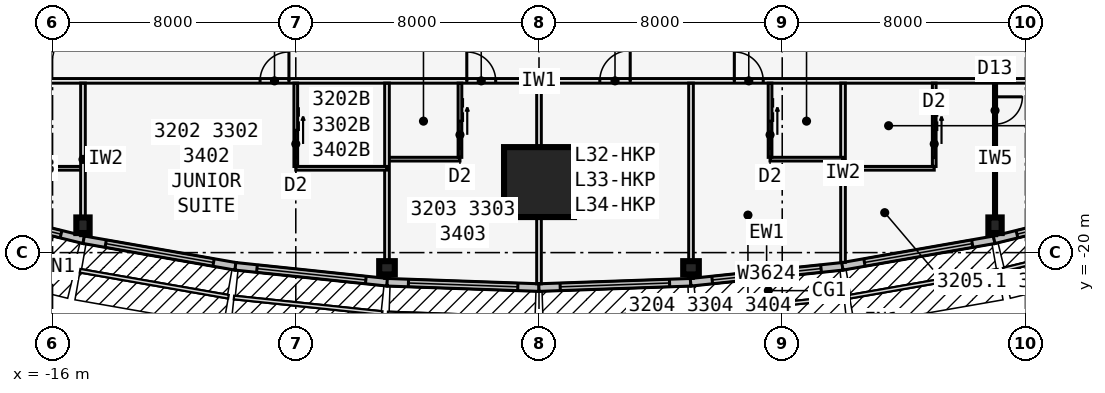
"""IFC4 building model, lengths in metres.
Left out: names, types, materials, properties, quantities, classifications, styles, units other than length and angle.
Written with IfcOpenShell. Run it as: python <this file> out.ifc"""

import sys

from ifc_helpers import new_model, si_unit, direction, frame, frame_2d, origin, origin_2d, place, context, subcontext, project, spatial, rectangle, i_section, extrude, element, fill, save


model = new_model("IFC4")
c1 = context("Model", 3, precision=1e-05, world=origin(), true_north=direction((0.0, 1.0)))
c2 = subcontext(c1, "Body", "Model", "MODEL_VIEW")
j1 = project(units=[si_unit("LENGTHUNIT", "METRE"), si_unit("PLANEANGLEUNIT", "RADIAN")], contexts=[c1])
p1 = place(None, origin())
s1 = spatial("IfcSite", under=j1, at=p1, CompositionType="ELEMENT")
p2 = place(p1, origin())
s2 = spatial("IfcBuilding", under=s1, at=p2, CompositionType="ELEMENT")
p3 = place(p2, frame((0.0, 0.0, 124.9)))
s3 = spatial("IfcBuildingStorey", under=s2, at=p3, CompositionType="ELEMENT", Elevation=124.9)
for number, where, z_axis, x_axis in (
    (1, (-15.0, -19.1, 0.0), (0.0, 0.0, 1.0), (1.0, 0.0, 0.0)),
    (2, (-5.0, -20.5, 0.0), (0.0, 0.0, 1.0), (0.0, -1.0, 0.0)),
    (3, (5.0, -20.5, 0.0), (0.0, 0.0, 1.0), (0.0, -1.0, 0.0)),
    (4, (15.0, -19.1, 0.0), (0.0, 0.0, 1.0), (1.0, 0.0, 0.0)),
):
    element("IfcColumn", number, at=place(p3, frame(where, z_axis=z_axis, x_axis=x_axis)), inside=s3, PredefinedType="COLUMN", context=c2, shape_type="SweptSolid", body=[
        extrude(i_section(OverallWidth=0.437, OverallDepth=0.513, WebThickness=0.061, FlangeThickness=0.097, at=origin_2d()), origin(), (0.0, 0.0, 1.0), 3.4),
    ])
p4 = place(p3, frame((0.0, -17.68, 0.0), z_axis=(0.0, 0.0, 1.0), x_axis=(0.0, -1.0, 0.0)))
e5 = element("IfcColumn", 5, at=p4, inside=s3, PredefinedType="COLUMN", context=c2, shape_type="SweptSolid", body=[
    extrude(rectangle(XDim=2.3, YDim=2.3, at=origin_2d()), origin(), (0.0, 0.0, 1.0), 3.4),
])
p5 = place(p3, frame((-19.97, -18.354, 0.0), z_axis=(0.0, 0.0, 1.0), x_axis=(0.971270024053, -0.237980126011, 0.0)))
e6 = element("IfcWall", 6, at=p5, inside=s3, PredefinedType="STANDARD", context=c2, shape_type="SweptSolid", body=[
    extrude(rectangle(XDim=5.148, YDim=0.25, at=frame_2d((2.574, 0.0))), origin(), (0.0, 0.0, 1.0), 3.235),
])
p6 = place(p5, frame((0.774, 0.0, 0.45)))
e7 = element("IfcOpeningElement", 7, at=p6, cuts=e6, PredefinedType="OPENING", context=c2, shape_type="SweptSolid", body=[
    extrude(rectangle(XDim=3.6, YDim=2.4, at=frame_2d((1.8, 1.2))), frame((0.0, 0.135, 0.0), z_axis=(0.0, -1.0, 0.0), x_axis=(1.0, 0.0, 0.0)), (0.0, 0.0, 1.0), 0.27),
])
p7 = place(p3, frame((-14.979, -19.577, 0.0), z_axis=(0.0, 0.0, 1.0), x_axis=(0.985030467156, -0.172380331752, 0.0)))
e8 = element("IfcWall", 8, at=p7, inside=s3, PredefinedType="STANDARD", context=c2, shape_type="SweptSolid", body=[
    extrude(rectangle(XDim=5.076, YDim=0.25, at=frame_2d((2.538, 0.0))), origin(), (0.0, 0.0, 1.0), 3.235),
])
p8 = place(p7, frame((0.738, 0.0, 0.45)))
e9 = element("IfcOpeningElement", 9, at=p8, cuts=e8, PredefinedType="OPENING", context=c2, shape_type="SweptSolid", body=[
    extrude(rectangle(XDim=3.6, YDim=2.4, at=frame_2d((1.8, 1.2))), frame((0.0, 0.135, 0.0), z_axis=(0.0, -1.0, 0.0), x_axis=(1.0, 0.0, 0.0)), (0.0, 0.0, 1.0), 0.27),
])
p9 = place(p3, frame((-9.987, -20.451, 0.0), z_axis=(0.0, 0.0, 1.0), x_axis=(0.994534683851, -0.104406717299, 0.0)))
e10 = element("IfcWall", 10, at=p9, inside=s3, PredefinedType="STANDARD", context=c2, shape_type="SweptSolid", body=[
    extrude(rectangle(XDim=5.028, YDim=0.25, at=frame_2d((2.514, 0.0))), origin(), (0.0, 0.0, 1.0), 3.235),
])
p10 = place(p9, frame((0.714, 0.0, 0.45)))
e11 = element("IfcOpeningElement", 11, at=p10, cuts=e10, PredefinedType="OPENING", context=c2, shape_type="SweptSolid", body=[
    extrude(rectangle(XDim=3.6, YDim=2.4, at=frame_2d((1.8, 1.2))), frame((0.0, 0.135, 0.0), z_axis=(0.0, -1.0, 0.0), x_axis=(1.0, 0.0, 0.0)), (0.0, 0.0, 1.0), 0.27),
])
p11 = place(p3, frame((-4.996, -20.975, 0.0), z_axis=(0.0, 0.0, 1.0), x_axis=(0.999387720943, -0.034988329879, 0.0)))
e12 = element("IfcWall", 12, at=p11, inside=s3, PredefinedType="STANDARD", context=c2, shape_type="SweptSolid", body=[
    extrude(rectangle(XDim=5.003, YDim=0.25, at=frame_2d((2.501, 0.0))), origin(), (0.0, 0.0, 1.0), 3.235),
])
p12 = place(p11, frame((0.701, 0.0, 0.45)))
e13 = element("IfcOpeningElement", 13, at=p12, cuts=e12, PredefinedType="OPENING", context=c2, shape_type="SweptSolid", body=[
    extrude(rectangle(XDim=3.6, YDim=2.4, at=frame_2d((1.8, 1.2))), frame((0.0, 0.135, 0.0), z_axis=(0.0, -1.0, 0.0), x_axis=(1.0, 0.0, 0.0)), (0.0, 0.0, 1.0), 0.27),
])
p13 = place(p3, frame((-0.004, -21.15, 0.0), z_axis=(0.0, 0.0, 1.0), x_axis=(0.999387720943, 0.034988329879, 0.0)))
e14 = element("IfcWall", 14, at=p13, inside=s3, PredefinedType="STANDARD", context=c2, shape_type="SweptSolid", body=[
    extrude(rectangle(XDim=5.003, YDim=0.25, at=frame_2d((2.501, 0.0))), origin(), (0.0, 0.0, 1.0), 3.235),
])
p14 = place(p13, frame((0.701, 0.0, 0.45)))
e15 = element("IfcOpeningElement", 15, at=p14, cuts=e14, PredefinedType="OPENING", context=c2, shape_type="SweptSolid", body=[
    extrude(rectangle(XDim=3.6, YDim=2.4, at=frame_2d((1.8, 1.2))), frame((0.0, 0.135, 0.0), z_axis=(0.0, -1.0, 0.0), x_axis=(1.0, 0.0, 0.0)), (0.0, 0.0, 1.0), 0.27),
])
p15 = place(p3, frame((4.987, -20.976, 0.0), z_axis=(0.0, 0.0, 1.0), x_axis=(0.994534683851, 0.104406717299, 0.0)))
e16 = element("IfcWall", 16, at=p15, inside=s3, PredefinedType="STANDARD", context=c2, shape_type="SweptSolid", body=[
    extrude(rectangle(XDim=5.028, YDim=0.25, at=frame_2d((2.514, 0.0))), origin(), (0.0, 0.0, 1.0), 3.235),
])
p16 = place(p15, frame((0.714, 0.0, 0.45)))
e17 = element("IfcOpeningElement", 17, at=p16, cuts=e16, PredefinedType="OPENING", context=c2, shape_type="SweptSolid", body=[
    extrude(rectangle(XDim=3.6, YDim=2.4, at=frame_2d((1.8, 1.2))), frame((0.0, 0.135, 0.0), z_axis=(0.0, -1.0, 0.0), x_axis=(1.0, 0.0, 0.0)), (0.0, 0.0, 1.0), 0.27),
])
p17 = place(p3, frame((9.979, -20.452, 0.0), z_axis=(0.0, 0.0, 1.0), x_axis=(0.985030467156, 0.172380331752, 0.0)))
e18 = element("IfcWall", 18, at=p17, inside=s3, PredefinedType="STANDARD", context=c2, shape_type="SweptSolid", body=[
    extrude(rectangle(XDim=5.076, YDim=0.25, at=frame_2d((2.538, 0.0))), origin(), (0.0, 0.0, 1.0), 3.235),
])
p18 = place(p17, frame((0.738, 0.0, 0.45)))
e19 = element("IfcOpeningElement", 19, at=p18, cuts=e18, PredefinedType="OPENING", context=c2, shape_type="SweptSolid", body=[
    extrude(rectangle(XDim=3.6, YDim=2.4, at=frame_2d((1.8, 1.2))), frame((0.0, 0.135, 0.0), z_axis=(0.0, -1.0, 0.0), x_axis=(1.0, 0.0, 0.0)), (0.0, 0.0, 1.0), 0.27),
])
p19 = place(p3, frame((14.97, -19.579, 0.0), z_axis=(0.0, 0.0, 1.0), x_axis=(0.971270024053, 0.237980126011, 0.0)))
e20 = element("IfcWall", 20, at=p19, inside=s3, PredefinedType="STANDARD", context=c2, shape_type="SweptSolid", body=[
    extrude(rectangle(XDim=5.148, YDim=0.25, at=frame_2d((2.574, 0.0))), origin(), (0.0, 0.0, 1.0), 3.235),
])
p20 = place(p19, frame((0.774, 0.0, 0.45)))
e21 = element("IfcOpeningElement", 21, at=p20, cuts=e20, PredefinedType="OPENING", context=c2, shape_type="SweptSolid", body=[
    extrude(rectangle(XDim=3.6, YDim=2.4, at=frame_2d((1.8, 1.2))), frame((0.0, 0.135, 0.0), z_axis=(0.0, -1.0, 0.0), x_axis=(1.0, 0.0, 0.0)), (0.0, 0.0, 1.0), 0.27),
])
p21 = place(p3, frame((-23.857, -14.351, 0.0), z_axis=(0.0, 0.0, 1.0), x_axis=(1.0, 0.0, 0.0)))
e22 = element("IfcWall", 22, at=p21, inside=s3, PredefinedType="PARTITIONING", context=c2, shape_type="SweptSolid", body=[
    extrude(rectangle(XDim=47.714, YDim=0.15, at=frame_2d((23.857, 0.0))), origin(), (0.0, 0.0, 1.0), 3.235),
])
p22 = place(p21, frame((4.682, 0.0, 0.0)))
e23 = element("IfcOpeningElement", 23, at=p22, cuts=e22, PredefinedType="OPENING", context=c2, shape_type="SweptSolid", body=[
    extrude(rectangle(XDim=0.95, YDim=2.13, at=frame_2d((0.475, 1.065))), frame((0.0, 0.085, 0.0), z_axis=(0.0, -1.0, 0.0), x_axis=(1.0, 0.0, 0.0)), (0.0, 0.0, 1.0), 0.17),
])
p23 = place(p21, frame((14.682, 0.0, 0.0)))
e24 = element("IfcOpeningElement", 24, at=p23, cuts=e22, PredefinedType="OPENING", context=c2, shape_type="SweptSolid", body=[
    extrude(rectangle(XDim=0.95, YDim=2.13, at=frame_2d((0.475, 1.065))), frame((0.0, 0.085, 0.0), z_axis=(0.0, -1.0, 0.0), x_axis=(1.0, 0.0, 0.0)), (0.0, 0.0, 1.0), 0.17),
])
p24 = place(p21, frame((21.482, 0.0, 0.0)))
e25 = element("IfcOpeningElement", 25, at=p24, cuts=e22, PredefinedType="OPENING", context=c2, shape_type="SweptSolid", body=[
    extrude(rectangle(XDim=0.95, YDim=2.13, at=frame_2d((0.475, 1.065))), frame((0.0, 0.085, 0.0), z_axis=(0.0, -1.0, 0.0), x_axis=(1.0, 0.0, 0.0)), (0.0, 0.0, 1.0), 0.17),
])
p25 = place(p21, frame((25.857, 0.0, 0.0)))
e26 = element("IfcOpeningElement", 26, at=p25, cuts=e22, PredefinedType="OPENING", context=c2, shape_type="SweptSolid", body=[
    extrude(rectangle(XDim=1.0, YDim=2.13, at=frame_2d((0.5, 1.065))), frame((0.0, 0.085, 0.0), z_axis=(0.0, -1.0, 0.0), x_axis=(1.0, 0.0, 0.0)), (0.0, 0.0, 1.0), 0.17),
])
p26 = place(p21, frame((30.282, 0.0, 0.0)))
e27 = element("IfcOpeningElement", 27, at=p26, cuts=e22, PredefinedType="OPENING", context=c2, shape_type="SweptSolid", body=[
    extrude(rectangle(XDim=0.95, YDim=2.13, at=frame_2d((0.475, 1.065))), frame((0.0, 0.085, 0.0), z_axis=(0.0, -1.0, 0.0), x_axis=(1.0, 0.0, 0.0)), (0.0, 0.0, 1.0), 0.17),
])
p27 = place(p21, frame((43.041, 0.0, 0.0)))
e28 = element("IfcOpeningElement", 28, at=p27, cuts=e22, PredefinedType="OPENING", context=c2, shape_type="SweptSolid", body=[
    extrude(rectangle(XDim=0.95, YDim=2.13, at=frame_2d((0.475, 1.065))), frame((0.0, 0.085, 0.0), z_axis=(0.0, -1.0, 0.0), x_axis=(1.0, 0.0, 0.0)), (0.0, 0.0, 1.0), 0.17),
])
p28 = place(p3, frame((-15.0, -14.426, 0.0), z_axis=(0.0, 0.0, 1.0), x_axis=(0.0, -1.0, 0.0)))
e29 = element("IfcWall", 29, at=p28, inside=s3, PredefinedType="PARTITIONING", context=c2, shape_type="SweptSolid", body=[
    extrude(rectangle(XDim=5.017, YDim=0.15, at=frame_2d((2.508, 0.0))), origin(), (0.0, 0.0, 1.0), 2.389),
])
p29 = place(p3, frame((-5.0, -14.426, 0.0), z_axis=(0.0, 0.0, 1.0), x_axis=(0.0, -1.0, 0.0)))
e30 = element("IfcWall", 30, at=p29, inside=s3, PredefinedType="PARTITIONING", context=c2, shape_type="SweptSolid", body=[
    extrude(rectangle(XDim=6.423, YDim=0.15, at=frame_2d((3.211, 0.0))), origin(), (0.0, 0.0, 1.0), 2.389),
])
p30 = place(p3, frame((0.0, -14.426, 0.0), z_axis=(0.0, 0.0, 1.0), x_axis=(0.0, -1.0, 0.0)))
e31 = element("IfcWall", 31, at=p30, inside=s3, PredefinedType="PARTITIONING", context=c2, shape_type="SweptSolid", body=[
    extrude(rectangle(XDim=6.599, YDim=0.15, at=frame_2d((3.299, 0.0))), origin(), (0.0, 0.0, 1.0), 2.389),
])
p31 = place(p3, frame((5.0, -14.426, 0.0), z_axis=(0.0, 0.0, 1.0), x_axis=(0.0, -1.0, 0.0)))
e32 = element("IfcWall", 32, at=p31, inside=s3, PredefinedType="PARTITIONING", context=c2, shape_type="SweptSolid", body=[
    extrude(rectangle(XDim=6.423, YDim=0.15, at=frame_2d((3.211, 0.0))), origin(), (0.0, 0.0, 1.0), 2.389),
])
p32 = place(p3, frame((10.0, -14.426, 0.0), z_axis=(0.0, 0.0, 1.0), x_axis=(0.0, -1.0, 0.0)))
e33 = element("IfcWall", 33, at=p32, inside=s3, PredefinedType="PARTITIONING", context=c2, shape_type="SweptSolid", body=[
    extrude(rectangle(XDim=5.895, YDim=0.15, at=frame_2d((2.948, 0.0))), origin(), (0.0, 0.0, 1.0), 2.389),
])
p33 = place(p3, frame((15.0, -14.426, 0.0), z_axis=(0.0, 0.0, 1.0), x_axis=(0.0, -1.0, 0.0)))
e34 = element("IfcWall", 34, at=p33, inside=s3, PredefinedType="PARTITIONING", context=c2, shape_type="SweptSolid", body=[
    extrude(rectangle(XDim=5.017, YDim=0.1, at=frame_2d((2.508, 0.0))), origin(), (0.0, 0.0, 1.0), 2.389),
])
p34 = place(p33, frame((0.45, 0.0, 0.0)))
e35 = element("IfcOpeningElement", 35, at=p34, cuts=e34, PredefinedType="OPENING", context=c2, shape_type="SweptSolid", body=[
    extrude(rectangle(XDim=0.9, YDim=2.13, at=frame_2d((0.45, 1.065))), frame((0.0, 0.06, 0.0), z_axis=(0.0, -1.0, 0.0), x_axis=(1.0, 0.0, 0.0)), (0.0, 0.0, 1.0), 0.12),
])
for number, where, z_axis, x_axis in (
    (36, (-18.0, -17.226, 0.0), (0.0, 0.0, 1.0), (1.0, 0.0, 0.0)),
    (37, (-8.0, -17.226, 0.0), (0.0, 0.0, 1.0), (1.0, 0.0, 0.0)),
):
    element("IfcWall", number, at=place(p3, frame(where, z_axis=z_axis, x_axis=x_axis)), inside=s3, PredefinedType="PLUMBINGWALL", context=c2, shape_type="SweptSolid", body=[
        extrude(rectangle(XDim=3.0, YDim=0.12, at=frame_2d((1.5, 0.0))), origin(), (0.0, 0.0, 1.0), 3.235),
    ])
p35 = place(p3, frame((-8.0, -14.426, 0.0), z_axis=(0.0, 0.0, 1.0), x_axis=(0.0, -1.0, 0.0)))
e38 = element("IfcWall", 38, at=p35, inside=s3, PredefinedType="PLUMBINGWALL", context=c2, shape_type="SweptSolid", body=[
    extrude(rectangle(XDim=2.74, YDim=0.12, at=frame_2d((1.37, 0.0))), origin(), (0.0, 0.0, 1.0), 3.235),
])
p36 = place(p35, frame((1.55, 0.0, 0.0)))
e39 = element("IfcOpeningElement", 39, at=p36, cuts=e38, PredefinedType="OPENING", context=c2, shape_type="SweptSolid", body=[
    extrude(rectangle(XDim=0.9, YDim=2.13, at=frame_2d((0.45, 1.065))), frame((0.0, 0.07, 0.0), z_axis=(0.0, -1.0, 0.0), x_axis=(1.0, 0.0, 0.0)), (0.0, 0.0, 1.0), 0.14),
])
p37 = place(p3, frame((-5.0, -16.926, 0.0), z_axis=(0.0, 0.0, 1.0), x_axis=(1.0, 0.0, 0.0)))
e40 = element("IfcWall", 40, at=p37, inside=s3, PredefinedType="PLUMBINGWALL", context=c2, shape_type="SweptSolid", body=[
    extrude(rectangle(XDim=2.4, YDim=0.12, at=frame_2d((1.2, 0.0))), origin(), (0.0, 0.0, 1.0), 3.235),
])
p38 = place(p3, frame((-2.6, -14.426, 0.0), z_axis=(0.0, 0.0, 1.0), x_axis=(0.0, -1.0, 0.0)))
e41 = element("IfcWall", 41, at=p38, inside=s3, PredefinedType="PLUMBINGWALL", context=c2, shape_type="SweptSolid", body=[
    extrude(rectangle(XDim=2.44, YDim=0.12, at=frame_2d((1.22, 0.0))), origin(), (0.0, 0.0, 1.0), 3.235),
])
p39 = place(p38, frame((1.25, 0.0, 0.0)))
e42 = element("IfcOpeningElement", 42, at=p39, cuts=e41, PredefinedType="OPENING", context=c2, shape_type="SweptSolid", body=[
    extrude(rectangle(XDim=0.9, YDim=2.13, at=frame_2d((0.45, 1.065))), frame((0.0, 0.07, 0.0), z_axis=(0.0, -1.0, 0.0), x_axis=(1.0, 0.0, 0.0)), (0.0, 0.0, 1.0), 0.14),
])
p40 = place(p3, frame((7.6, -16.926, 0.0), z_axis=(0.0, 0.0, 1.0), x_axis=(1.0, 0.0, 0.0)))
e43 = element("IfcWall", 43, at=p40, inside=s3, PredefinedType="PLUMBINGWALL", context=c2, shape_type="SweptSolid", body=[
    extrude(rectangle(XDim=2.4, YDim=0.12, at=frame_2d((1.2, 0.0))), origin(), (0.0, 0.0, 1.0), 3.235),
])
p41 = place(p3, frame((7.6, -14.426, 0.0), z_axis=(0.0, 0.0, 1.0), x_axis=(0.0, -1.0, 0.0)))
e44 = element("IfcWall", 44, at=p41, inside=s3, PredefinedType="PLUMBINGWALL", context=c2, shape_type="SweptSolid", body=[
    extrude(rectangle(XDim=2.44, YDim=0.12, at=frame_2d((1.22, 0.0))), origin(), (0.0, 0.0, 1.0), 3.235),
])
p42 = place(p41, frame((1.25, 0.0, 0.0)))
e45 = element("IfcOpeningElement", 45, at=p42, cuts=e44, PredefinedType="OPENING", context=c2, shape_type="SweptSolid", body=[
    extrude(rectangle(XDim=0.9, YDim=2.13, at=frame_2d((0.45, 1.065))), frame((0.0, 0.07, 0.0), z_axis=(0.0, -1.0, 0.0), x_axis=(1.0, 0.0, 0.0)), (0.0, 0.0, 1.0), 0.14),
])
p43 = place(p3, frame((10.0, -17.226, 0.0), z_axis=(0.0, 0.0, 1.0), x_axis=(1.0, 0.0, 0.0)))
e46 = element("IfcWall", 46, at=p43, inside=s3, PredefinedType="PLUMBINGWALL", context=c2, shape_type="SweptSolid", body=[
    extrude(rectangle(XDim=3.0, YDim=0.12, at=frame_2d((1.5, 0.0))), origin(), (0.0, 0.0, 1.0), 3.235),
])
p44 = place(p3, frame((13.0, -14.426, 0.0), z_axis=(0.0, 0.0, 1.0), x_axis=(0.0, -1.0, 0.0)))
e47 = element("IfcWall", 47, at=p44, inside=s3, PredefinedType="PLUMBINGWALL", context=c2, shape_type="SweptSolid", body=[
    extrude(rectangle(XDim=2.74, YDim=0.12, at=frame_2d((1.37, 0.0))), origin(), (0.0, 0.0, 1.0), 3.235),
])
p45 = place(p44, frame((1.55, 0.0, 0.0)))
e48 = element("IfcOpeningElement", 48, at=p45, cuts=e47, PredefinedType="OPENING", context=c2, shape_type="SweptSolid", body=[
    extrude(rectangle(XDim=0.9, YDim=2.13, at=frame_2d((0.45, 1.065))), frame((0.0, 0.07, 0.0), z_axis=(0.0, -1.0, 0.0), x_axis=(1.0, 0.0, 0.0)), (0.0, 0.0, 1.0), 0.14),
])
p46 = place(p6, origin())
e49 = element("IfcWindow", 49, at=p46, inside=s3, PartitioningType="SINGLE_PANEL", PredefinedType="WINDOW", context=c2, shape_type="SweptSolid", body=[
    extrude(rectangle(XDim=3.6, YDim=2.4, at=frame_2d((1.8, 1.2))), frame((0.0, 0.03, 0.0), z_axis=(0.0, -1.0, 0.0), x_axis=(1.0, 0.0, 0.0)), (0.0, 0.0, 1.0), 0.06),
])
fill(e7, e49)
p47 = place(p8, origin())
e50 = element("IfcWindow", 50, at=p47, inside=s3, PartitioningType="SINGLE_PANEL", PredefinedType="WINDOW", context=c2, shape_type="SweptSolid", body=[
    extrude(rectangle(XDim=3.6, YDim=2.4, at=frame_2d((1.8, 1.2))), frame((0.0, 0.03, 0.0), z_axis=(0.0, -1.0, 0.0), x_axis=(1.0, 0.0, 0.0)), (0.0, 0.0, 1.0), 0.06),
])
fill(e9, e50)
p48 = place(p10, origin())
e51 = element("IfcWindow", 51, at=p48, inside=s3, PartitioningType="SINGLE_PANEL", PredefinedType="WINDOW", context=c2, shape_type="SweptSolid", body=[
    extrude(rectangle(XDim=3.6, YDim=2.4, at=frame_2d((1.8, 1.2))), frame((0.0, 0.03, 0.0), z_axis=(0.0, -1.0, 0.0), x_axis=(1.0, 0.0, 0.0)), (0.0, 0.0, 1.0), 0.06),
])
fill(e11, e51)
p49 = place(p12, origin())
e52 = element("IfcWindow", 52, at=p49, inside=s3, PartitioningType="SINGLE_PANEL", PredefinedType="WINDOW", context=c2, shape_type="SweptSolid", body=[
    extrude(rectangle(XDim=3.6, YDim=2.4, at=frame_2d((1.8, 1.2))), frame((0.0, 0.03, 0.0), z_axis=(0.0, -1.0, 0.0), x_axis=(1.0, 0.0, 0.0)), (0.0, 0.0, 1.0), 0.06),
])
fill(e13, e52)
p50 = place(p14, origin())
e53 = element("IfcWindow", 53, at=p50, inside=s3, PartitioningType="SINGLE_PANEL", PredefinedType="WINDOW", context=c2, shape_type="SweptSolid", body=[
    extrude(rectangle(XDim=3.6, YDim=2.4, at=frame_2d((1.8, 1.2))), frame((0.0, 0.03, 0.0), z_axis=(0.0, -1.0, 0.0), x_axis=(1.0, 0.0, 0.0)), (0.0, 0.0, 1.0), 0.06),
])
fill(e15, e53)
p51 = place(p16, origin())
e54 = element("IfcWindow", 54, at=p51, inside=s3, PartitioningType="SINGLE_PANEL", PredefinedType="WINDOW", context=c2, shape_type="SweptSolid", body=[
    extrude(rectangle(XDim=3.6, YDim=2.4, at=frame_2d((1.8, 1.2))), frame((0.0, 0.03, 0.0), z_axis=(0.0, -1.0, 0.0), x_axis=(1.0, 0.0, 0.0)), (0.0, 0.0, 1.0), 0.06),
])
fill(e17, e54)
p52 = place(p18, origin())
e55 = element("IfcWindow", 55, at=p52, inside=s3, PartitioningType="SINGLE_PANEL", PredefinedType="WINDOW", context=c2, shape_type="SweptSolid", body=[
    extrude(rectangle(XDim=3.6, YDim=2.4, at=frame_2d((1.8, 1.2))), frame((0.0, 0.03, 0.0), z_axis=(0.0, -1.0, 0.0), x_axis=(1.0, 0.0, 0.0)), (0.0, 0.0, 1.0), 0.06),
])
fill(e19, e55)
p53 = place(p20, origin())
e56 = element("IfcWindow", 56, at=p53, inside=s3, PartitioningType="SINGLE_PANEL", PredefinedType="WINDOW", context=c2, shape_type="SweptSolid", body=[
    extrude(rectangle(XDim=3.6, YDim=2.4, at=frame_2d((1.8, 1.2))), frame((0.0, 0.03, 0.0), z_axis=(0.0, -1.0, 0.0), x_axis=(1.0, 0.0, 0.0)), (0.0, 0.0, 1.0), 0.06),
])
fill(e21, e56)
p54 = place(p34, origin())
e57 = element("IfcDoor", 57, at=p54, inside=s3, OperationType="SINGLE_SWING_LEFT", PredefinedType="DOOR", context=c2, shape_type="SweptSolid", body=[
    extrude(rectangle(XDim=0.9, YDim=2.13, at=frame_2d((0.45, 1.065))), frame((0.0, 0.025, 0.0), z_axis=(0.0, -1.0, 0.0), x_axis=(1.0, 0.0, 0.0)), (0.0, 0.0, 1.0), 0.05),
])
fill(e35, e57)
p55 = place(p36, origin())
e58 = element("IfcDoor", 58, at=p55, inside=s3, OperationType="SLIDING_TO_LEFT", PredefinedType="DOOR", context=c2, shape_type="SweptSolid", body=[
    extrude(rectangle(XDim=0.9, YDim=2.13, at=frame_2d((0.45, 1.065))), frame((0.0, 0.025, 0.0), z_axis=(0.0, -1.0, 0.0), x_axis=(1.0, 0.0, 0.0)), (0.0, 0.0, 1.0), 0.05),
])
fill(e39, e58)
p56 = place(p23, origin())
e59 = element("IfcDoor", 59, at=p56, inside=s3, OperationType="SINGLE_SWING_RIGHT", PredefinedType="DOOR", context=c2, shape_type="SweptSolid", body=[
    extrude(rectangle(XDim=0.95, YDim=2.13, at=frame_2d((0.475, 1.065))), frame((0.0, 0.025, 0.0), z_axis=(0.0, -1.0, 0.0), x_axis=(1.0, 0.0, 0.0)), (0.0, 0.0, 1.0), 0.05),
])
fill(e24, e59)
p57 = place(p39, origin())
e60 = element("IfcDoor", 60, at=p57, inside=s3, OperationType="SLIDING_TO_LEFT", PredefinedType="DOOR", context=c2, shape_type="SweptSolid", body=[
    extrude(rectangle(XDim=0.9, YDim=2.13, at=frame_2d((0.45, 1.065))), frame((0.0, 0.025, 0.0), z_axis=(0.0, -1.0, 0.0), x_axis=(1.0, 0.0, 0.0)), (0.0, 0.0, 1.0), 0.05),
])
fill(e42, e60)
p58 = place(p24, origin())
e61 = element("IfcDoor", 61, at=p58, inside=s3, OperationType="SINGLE_SWING_LEFT", PredefinedType="DOOR", context=c2, shape_type="SweptSolid", body=[
    extrude(rectangle(XDim=0.95, YDim=2.13, at=frame_2d((0.475, 1.065))), frame((0.0, 0.025, 0.0), z_axis=(0.0, -1.0, 0.0), x_axis=(1.0, 0.0, 0.0)), (0.0, 0.0, 1.0), 0.05),
])
fill(e25, e61)
p59 = place(p25, origin())
e62 = element("IfcDoor", 62, at=p59, inside=s3, OperationType="SINGLE_SWING_RIGHT", PredefinedType="DOOR", context=c2, shape_type="SweptSolid", body=[
    extrude(rectangle(XDim=1.0, YDim=2.13, at=frame_2d((0.5, 1.065))), frame((0.0, 0.025, 0.0), z_axis=(0.0, -1.0, 0.0), x_axis=(1.0, 0.0, 0.0)), (0.0, 0.0, 1.0), 0.05),
])
fill(e26, e62)
p60 = place(p42, origin())
e63 = element("IfcDoor", 63, at=p60, inside=s3, OperationType="SLIDING_TO_LEFT", PredefinedType="DOOR", context=c2, shape_type="SweptSolid", body=[
    extrude(rectangle(XDim=0.9, YDim=2.13, at=frame_2d((0.45, 1.065))), frame((0.0, 0.025, 0.0), z_axis=(0.0, -1.0, 0.0), x_axis=(1.0, 0.0, 0.0)), (0.0, 0.0, 1.0), 0.05),
])
fill(e45, e63)
p61 = place(p26, origin())
e64 = element("IfcDoor", 64, at=p61, inside=s3, OperationType="SINGLE_SWING_LEFT", PredefinedType="DOOR", context=c2, shape_type="SweptSolid", body=[
    extrude(rectangle(XDim=0.95, YDim=2.13, at=frame_2d((0.475, 1.065))), frame((0.0, 0.025, 0.0), z_axis=(0.0, -1.0, 0.0), x_axis=(1.0, 0.0, 0.0)), (0.0, 0.0, 1.0), 0.05),
])
fill(e27, e64)
p62 = place(p45, origin())
e65 = element("IfcDoor", 65, at=p62, inside=s3, OperationType="SLIDING_TO_LEFT", PredefinedType="DOOR", context=c2, shape_type="SweptSolid", body=[
    extrude(rectangle(XDim=0.9, YDim=2.13, at=frame_2d((0.45, 1.065))), frame((0.0, 0.025, 0.0), z_axis=(0.0, -1.0, 0.0), x_axis=(1.0, 0.0, 0.0)), (0.0, 0.0, 1.0), 0.05),
])
fill(e48, e65)
save(model, sys.argv[1])
